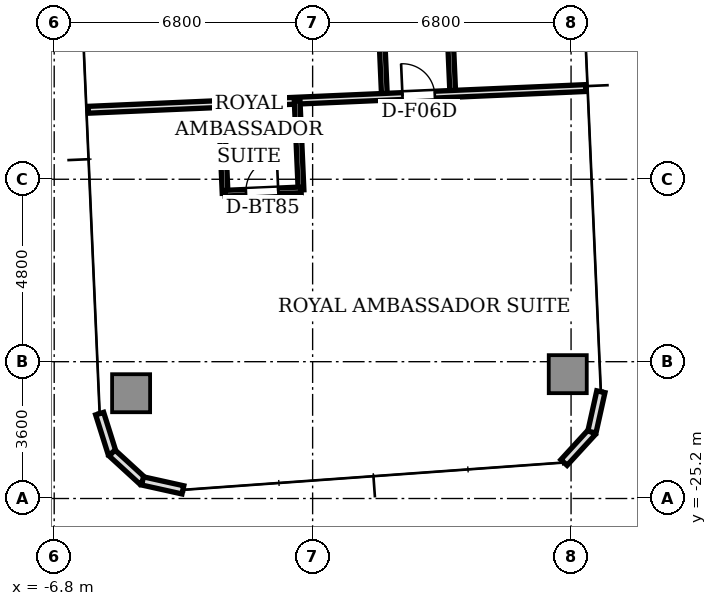
"""IFC4 building model, lengths in metres.
Left out: names, types, materials, properties, quantities, classifications, styles, units other than length and angle.
Written with IfcOpenShell. Run it as: python <this file> out.ifc"""

import sys

from ifc_helpers import new_model, si_unit, direction, frame, frame_2d, origin, origin_2d, place, context, subcontext, project, spatial, rectangle, extrude, source, transform, mapped, element, fill, save


model = new_model("IFC4")
c1 = context("Model", 3, precision=1e-05, world=origin(), true_north=direction((0.0, 1.0)))
c2 = subcontext(c1, "Body", "Model", "MODEL_VIEW")
j1 = project(units=[si_unit("LENGTHUNIT", "METRE"), si_unit("PLANEANGLEUNIT", "RADIAN")], contexts=[c1])
p1 = place(None, origin())
s1 = spatial("IfcSite", under=j1, at=p1, CompositionType="ELEMENT")
p2 = place(p1, origin())
s2 = spatial("IfcBuilding", under=s1, at=p2, CompositionType="ELEMENT")
p3 = place(p2, frame((0.0, 0.0, 93.55)))
s3 = spatial("IfcBuildingStorey", under=s2, at=p3, CompositionType="ELEMENT", Elevation=93.55)
m1 = source(origin(), c2, "Body", "SweptSolid", [
    extrude(rectangle(XDim=1.0, YDim=1.0, at=origin_2d()), origin(), (0.0, 0.0, 1.0), 3.11),
])
for number, where, z_axis, x_axis in (
    (1, (-4.776, -22.43, 0.0), (0.0, 0.0, 1.0), (1.0, 0.0, 0.0)),
    (2, (6.713, -21.928, 0.0), (0.0, 0.0, 1.0), (1.0, 0.0, 0.0)),
):
    element("IfcColumn", number, at=place(p3, frame(where, z_axis=z_axis, x_axis=x_axis)), inside=s3, PredefinedType="COLUMN", context=c2, shape_type="MappedRepresentation", body=[
        mapped(m1, transform((0.0, 0.0, 0.0), scale=1.0)),
    ])
p4 = place(p3, frame((-5.604, -22.966, 0.0), z_axis=(0.0, 0.0, 1.0), x_axis=(0.300755105707, -0.953701403161, 0.0)))
e3 = element("IfcWall", 3, at=p4, inside=s3, PredefinedType="STANDARD", context=c2, shape_type="SweptSolid", body=[
    extrude(rectangle(XDim=1.087, YDim=0.22, at=frame_2d((0.543, 0.0))), origin(), (0.0, 0.0, 1.0), 3.11),
])
p5 = place(p3, frame((-5.277, -24.003, 0.0), z_axis=(0.0, 0.0, 1.0), x_axis=(0.737312600672, -0.675551721847, 0.0)))
e4 = element("IfcWall", 4, at=p5, inside=s3, PredefinedType="STANDARD", context=c2, shape_type="SweptSolid", body=[
    extrude(rectangle(XDim=1.087, YDim=0.22, at=frame_2d((0.543, 0.0))), origin(), (0.0, 0.0, 1.0), 3.11),
])
for number, where, z_axis, x_axis in (
    (5, (-4.475, -24.737, 0.0), (0.0, 0.0, 1.0), (0.976, -0.217, 0.0)),
    (6, (6.614, -24.253, 0.0), (0.0, 0.0, 1.0), (0.676, 0.737, 0.0)),
):
    element("IfcWall", number, at=place(p3, frame(where, z_axis=z_axis, x_axis=x_axis)), inside=s3, PredefinedType="STANDARD", context=c2, shape_type="SweptSolid", body=[
        extrude(rectangle(XDim=1.087, YDim=0.22, at=frame_2d((0.543, 0.0))), origin(), (0.0, 0.0, 1.0), 3.11),
    ])
p6 = place(p3, frame((7.349, -23.452, 0.0), z_axis=(0.0, 0.0, 1.0), x_axis=(0.216454939174, 0.976292609471, 0.0)))
e7 = element("IfcWall", 7, at=p6, inside=s3, PredefinedType="STANDARD", context=c2, shape_type="SweptSolid", body=[
    extrude(rectangle(XDim=1.087, YDim=0.22, at=frame_2d((0.544, 0.0))), origin(), (0.0, 0.0, 1.0), 3.11),
])
p7 = place(p3, frame((3.542, -11.206, 0.0), z_axis=(0.0, 0.0, 1.0), x_axis=(0.043582710367, -0.99904982226, 0.0)))
e8 = element("IfcWall", 8, at=p7, inside=s3, PredefinedType="PARTITIONING", context=c2, shape_type="SweptSolid", body=[
    extrude(rectangle(XDim=3.35, YDim=0.15, at=frame_2d((1.675, 0.0))), origin(), (0.0, 0.0, 1.0), 2.66),
])
p8 = place(p7, frame((1.2, 0.0, 0.0)))
e9 = element("IfcOpeningElement", 9, at=p8, cuts=e8, PredefinedType="OPENING", context=c2, shape_type="SweptSolid", body=[
    extrude(rectangle(XDim=0.85, YDim=2.1, at=frame_2d((0.425, 1.05))), frame((0.0, 0.085, 0.0), z_axis=(0.0, -1.0, 0.0), x_axis=(1.0, 0.0, 0.0)), (0.0, 0.0, 1.0), 0.17),
])
p9 = place(p3, frame((1.744, -11.285, 0.0), z_axis=(0.0, 0.0, 1.0), x_axis=(0.043579537274, -0.999049960678, 0.0)))
e10 = element("IfcWall", 10, at=p9, inside=s3, PredefinedType="PARTITIONING", context=c2, shape_type="SweptSolid", body=[
    extrude(rectangle(XDim=3.35, YDim=0.15, at=frame_2d((1.675, 0.0))), origin(), (0.0, 0.0, 1.0), 2.66),
])
p10 = place(p9, frame((1.2, 0.0, 0.0)))
e11 = element("IfcOpeningElement", 11, at=p10, cuts=e10, PredefinedType="OPENING", context=c2, shape_type="SweptSolid", body=[
    extrude(rectangle(XDim=0.85, YDim=2.1, at=frame_2d((0.425, 1.05))), frame((0.0, 0.085, 0.0), z_axis=(0.0, -1.0, 0.0), x_axis=(1.0, 0.0, 0.0)), (0.0, 0.0, 1.0), 0.17),
])
p11 = place(p3, frame((-5.903, -14.972, 0.0), z_axis=(0.0, 0.0, 1.0), x_axis=(0.999048653727, 0.043609488494, 0.0)))
e12 = element("IfcWall", 12, at=p11, inside=s3, PredefinedType="PARTITIONING", context=c2, shape_type="SweptSolid", body=[
    extrude(rectangle(XDim=13.1, YDim=0.18, at=frame_2d((6.55, 0.0))), origin(), (0.0, 0.0, 1.0), 2.66),
])
p12 = place(p11, frame((8.275, 0.0, 0.0)))
e13 = element("IfcOpeningElement", 13, at=p12, cuts=e12, PredefinedType="OPENING", context=c2, shape_type="SweptSolid", body=[
    extrude(rectangle(XDim=0.85, YDim=2.1, at=frame_2d((0.425, 1.05))), frame((0.0, 0.1, 0.0), z_axis=(0.0, -1.0, 0.0), x_axis=(1.0, 0.0, 0.0)), (0.0, 0.0, 1.0), 0.2),
])
p13 = place(p3, frame((-0.408, -14.732, 0.0), z_axis=(0.0, 0.0, 1.0), x_axis=(0.043527387554, -0.999052234136, 0.0)))
e14 = element("IfcWall", 14, at=p13, inside=s3, PredefinedType="PARTITIONING", context=c2, shape_type="SweptSolid", body=[
    extrude(rectangle(XDim=2.35, YDim=0.15, at=frame_2d((1.175, 0.0))), origin(), (0.0, 0.0, 1.0), 2.66),
])
p14 = place(p3, frame((-2.406, -14.819, 0.0), z_axis=(0.0, 0.0, 1.0), x_axis=(0.04363560271, -0.999047513473, 0.0)))
e15 = element("IfcWall", 15, at=p14, inside=s3, PredefinedType="PARTITIONING", context=c2, shape_type="SweptSolid", body=[
    extrude(rectangle(XDim=2.35, YDim=0.15, at=frame_2d((1.175, 0.0))), origin(), (0.0, 0.0, 1.0), 2.66),
])
p15 = place(p3, frame((-2.303, -17.167, 0.0), z_axis=(0.0, 0.0, 1.0), x_axis=(0.999049929275, 0.043580257179, 0.0)))
e16 = element("IfcWall", 16, at=p15, inside=s3, PredefinedType="PARTITIONING", context=c2, shape_type="SweptSolid", body=[
    extrude(rectangle(XDim=2.0, YDim=0.15, at=frame_2d((1.0, 0.0))), origin(), (0.0, 0.0, 1.0), 2.66),
])
p16 = place(p15, frame((0.55, 0.0, 0.0)))
e17 = element("IfcOpeningElement", 17, at=p16, cuts=e16, PredefinedType="OPENING", context=c2, shape_type="SweptSolid", body=[
    extrude(rectangle(XDim=0.85, YDim=2.1, at=frame_2d((0.425, 1.05))), frame((0.0, 0.085, 0.0), z_axis=(0.0, -1.0, 0.0), x_axis=(1.0, 0.0, 0.0)), (0.0, 0.0, 1.0), 0.17),
])
m2 = source(origin(), c2, "Body", "SweptSolid", [
    extrude(rectangle(XDim=0.85, YDim=0.05, at=origin_2d()), origin(), (0.0, 0.0, 1.0), 2.1),
])
p17 = place(p16, frame((0.425, 0.0, 0.0)))
e18 = element("IfcDoor", 18, at=p17, inside=s3, OperationType="SINGLE_SWING_RIGHT", PredefinedType="DOOR", context=c2, shape_type="MappedRepresentation", body=[
    mapped(m2, transform((0.0, 0.0, 0.0), scale=1.0)),
])
fill(e17, e18)
p18 = place(p12, frame((0.425, 0.0, 0.0)))
e19 = element("IfcDoor", 19, at=p18, inside=s3, OperationType="SINGLE_SWING_LEFT", PredefinedType="DOOR", context=c2, shape_type="MappedRepresentation", body=[
    mapped(m2, transform((0.0, 0.0, 0.0), scale=1.0)),
])
fill(e13, e19)
save(model, sys.argv[1])
